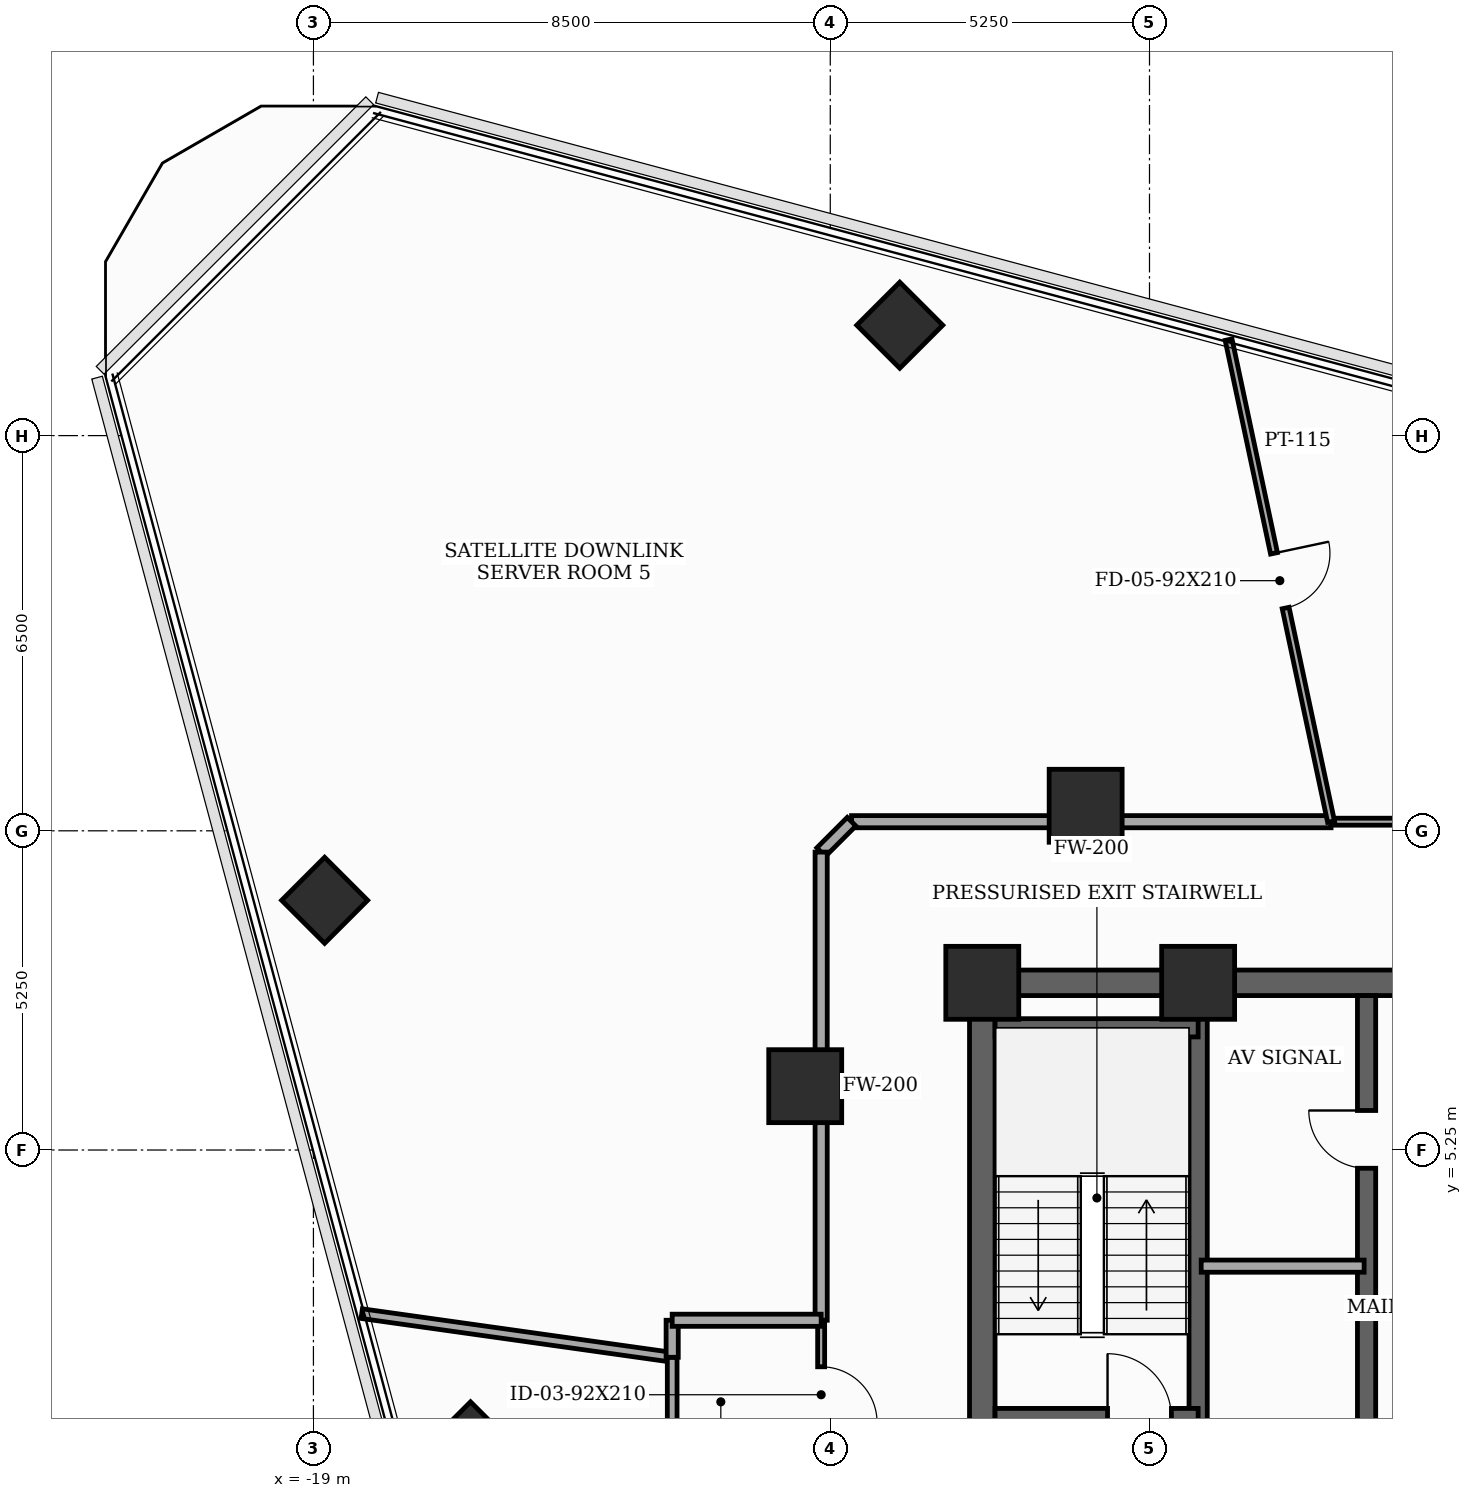
"""IFC4 building model, lengths in metres.
Left out: names, types, materials, properties, quantities, classifications, styles, units other than length and angle.
Written with IfcOpenShell. Run it as: python <this file> out.ifc"""

import sys

from ifc_helpers import new_model, si_unit, direction, frame, frame_2d, origin, origin_2d, place, context, subcontext, project, spatial, rectangle, extrude, element, fill, save


model = new_model("IFC4")
c1 = context("Model", 3, precision=1e-05, world=origin(), true_north=direction((0.0, 1.0)))
c2 = subcontext(c1, "Body", "Model", "MODEL_VIEW")
j1 = project(units=[si_unit("LENGTHUNIT", "METRE"), si_unit("PLANEANGLEUNIT", "RADIAN")], contexts=[c1])
p1 = place(None, origin())
s1 = spatial("IfcSite", under=j1, at=p1, CompositionType="ELEMENT")
p2 = place(p1, origin())
s2 = spatial("IfcBuilding", under=s1, at=p2, CompositionType="ELEMENT")
p3 = place(p2, frame((0.0, 0.0, 199.0)))
s3 = spatial("IfcBuildingStorey", under=s2, at=p3, CompositionType="ELEMENT", Elevation=199.0)
for number, where, z_axis, x_axis in (
    (1, (-4.45, 8.0, 0.0), (0.0, 0.0, 1.0), (1.0, 0.0, 0.0)),
    (2, (-8.0, 8.0, 0.0), (0.0, 0.0, 1.0), (1.0, 0.0, 0.0)),
    (3, (-6.3, 10.912, 0.0), (0.0, 0.0, 1.0), (1.0, 0.0, 0.0)),
    (4, (-10.912, 6.3, 0.0), (0.0, 0.0, 1.0), (1.0, 0.0, 0.0)),
):
    element("IfcColumn", number, at=place(p3, frame(where, z_axis=z_axis, x_axis=x_axis)), inside=s3, PredefinedType="COLUMN", context=c2, shape_type="SweptSolid", body=[
        extrude(rectangle(XDim=1.2, YDim=1.2, at=origin_2d()), origin(), (0.0, 0.0, 1.0), 3.7),
    ])
for number, where, z_axis, x_axis in (
    (5, (-9.357, 18.816, 0.0), (0.0, 0.0, 1.0), (0.707, 0.707, 0.0)),
    (6, (-18.816, 9.357, 0.0), (0.0, 0.0, 1.0), (0.707, 0.707, 0.0)),
    (7, (-16.416, 0.401, 0.0), (0.0, 0.0, 1.0), (0.707, 0.707, 0.0)),
):
    element("IfcColumn", number, at=place(p3, frame(where, z_axis=z_axis, x_axis=x_axis)), inside=s3, PredefinedType="COLUMN", context=c2, shape_type="SweptSolid", body=[
        extrude(rectangle(XDim=1.0, YDim=1.0, at=origin_2d()), origin(), (0.0, 0.0, 1.0), 3.7),
    ])
p4 = place(p3, frame((-8.0, -8.0, 0.0), z_axis=(0.0, 0.0, 1.0), x_axis=(0.0, 1.0, 0.0)))
e8 = element("IfcWall", 8, at=p4, inside=s3, PredefinedType="SHEAR", context=c2, shape_type="SweptSolid", body=[
    extrude(rectangle(XDim=16.0, YDim=0.42, at=frame_2d((8.0, 0.0))), origin(), (0.0, 0.0, 1.0), 3.5),
])
p5 = place(p4, frame((0.761, 0.0, 0.0)))
e9 = element("IfcOpeningElement", 9, at=p5, cuts=e8, PredefinedType="OPENING", context=c2, shape_type="SweptSolid", body=[
    extrude(rectangle(XDim=0.85, YDim=2.02, at=frame_2d((0.425, 1.01))), frame((0.0, 0.22, 0.0), z_axis=(0.0, -1.0, 0.0), x_axis=(1.0, 0.0, 0.0)), (0.0, 0.0, 1.0), 0.44),
])
p6 = place(p4, frame((5.35, 0.0, 0.0)))
e10 = element("IfcOpeningElement", 10, at=p6, cuts=e8, PredefinedType="OPENING", context=c2, shape_type="SweptSolid", body=[
    extrude(rectangle(XDim=1.05, YDim=2.15, at=frame_2d((0.525, 1.075))), frame((0.0, 0.22, 0.0), z_axis=(0.0, -1.0, 0.0), x_axis=(1.0, 0.0, 0.0)), (0.0, 0.0, 1.0), 0.44),
])
p7 = place(p3, frame((-8.0, 8.0, 0.0), z_axis=(0.0, 0.0, 1.0), x_axis=(1.0, 0.0, 0.0)))
e11 = element("IfcWall", 11, at=p7, inside=s3, PredefinedType="SHEAR", context=c2, shape_type="SweptSolid", body=[
    extrude(rectangle(XDim=16.0, YDim=0.42, at=frame_2d((8.0, 0.0))), origin(), (0.0, 0.0, 1.0), 3.5),
])
p8 = place(p7, frame((7.1, 0.0, 0.0)))
e12 = element("IfcOpeningElement", 12, at=p8, cuts=e11, PredefinedType="OPENING", context=c2, shape_type="SweptSolid", body=[
    extrude(rectangle(XDim=1.8, YDim=2.15, at=frame_2d((0.9, 1.075))), frame((0.0, 0.22, 0.0), z_axis=(0.0, -1.0, 0.0), x_axis=(1.0, 0.0, 0.0)), (0.0, 0.0, 1.0), 0.44),
])
p9 = place(p3, frame((-4.45, -7.79, 0.0), z_axis=(0.0, 0.0, 1.0), x_axis=(0.0, 1.0, 0.0)))
e13 = element("IfcWall", 13, at=p9, inside=s3, PredefinedType="SHEAR", context=c2, shape_type="SweptSolid", body=[
    extrude(rectangle(XDim=15.58, YDim=0.3, at=frame_2d((7.79, 0.0))), origin(), (0.0, 0.0, 1.0), 3.5),
])
p10 = place(p3, frame((-7.79, 0.85, 0.0), z_axis=(0.0, 0.0, 1.0), x_axis=(1.0, 0.0, 0.0)))
e14 = element("IfcWall", 14, at=p10, inside=s3, PredefinedType="SHEAR", context=c2, shape_type="SweptSolid", body=[
    extrude(rectangle(XDim=3.34, YDim=0.3, at=frame_2d((1.67, 0.0))), origin(), (0.0, 0.0, 1.0), 3.5),
])
p11 = place(p10, frame((1.85, 0.0, 0.0)))
e15 = element("IfcOpeningElement", 15, at=p11, cuts=e14, PredefinedType="OPENING", context=c2, shape_type="SweptSolid", body=[
    extrude(rectangle(XDim=1.05, YDim=2.15, at=frame_2d((0.525, 1.075))), frame((0.0, 0.16, 0.0), z_axis=(0.0, -1.0, 0.0), x_axis=(1.0, 0.0, 0.0)), (0.0, 0.0, 1.0), 0.32),
])
p12 = place(p3, frame((-7.79, 7.26, 0.0), z_axis=(0.0, 0.0, 1.0), x_axis=(1.0, 0.0, 0.0)))
e16 = element("IfcWall", 16, at=p12, inside=s3, PredefinedType="SHEAR", context=c2, shape_type="SweptSolid", body=[
    extrude(rectangle(XDim=3.34, YDim=0.3, at=frame_2d((1.67, 0.0))), origin(), (0.0, 0.0, 1.0), 3.5),
])
p13 = place(p3, frame((-1.68, -4.85, 0.0), z_axis=(0.0, 0.0, 1.0), x_axis=(0.0, 1.0, 0.0)))
e17 = element("IfcWall", 17, at=p13, inside=s3, PredefinedType="SHEAR", context=c2, shape_type="SweptSolid", body=[
    extrude(rectangle(XDim=12.64, YDim=0.3, at=frame_2d((6.32, 0.0))), origin(), (0.0, 0.0, 1.0), 3.5),
])
p14 = place(p13, frame((3.5, 0.0, 0.0)))
e18 = element("IfcOpeningElement", 18, at=p14, cuts=e17, PredefinedType="OPENING", context=c2, shape_type="SweptSolid", body=[
    extrude(rectangle(XDim=0.95, YDim=2.1, at=frame_2d((0.475, 1.05))), frame((0.0, 0.16, 0.0), z_axis=(0.0, -1.0, 0.0), x_axis=(1.0, 0.0, 0.0)), (0.0, 0.0, 1.0), 0.32),
])
p15 = place(p13, frame((9.8, 0.0, 0.0)))
e19 = element("IfcOpeningElement", 19, at=p15, cuts=e17, PredefinedType="OPENING", context=c2, shape_type="SweptSolid", body=[
    extrude(rectangle(XDim=0.95, YDim=2.1, at=frame_2d((0.475, 1.05))), frame((0.0, 0.16, 0.0), z_axis=(0.0, -1.0, 0.0), x_axis=(1.0, 0.0, 0.0)), (0.0, 0.0, 1.0), 0.32),
])
p16 = place(p3, frame((-4.4, 3.34, 0.0), z_axis=(0.0, 0.0, 1.0), x_axis=(1.0, 0.0, 0.0)))
e20 = element("IfcWall", 20, at=p16, inside=s3, PredefinedType="SOLIDWALL", context=c2, shape_type="SweptSolid", body=[
    extrude(rectangle(XDim=2.68, YDim=0.2, at=frame_2d((1.34, 0.0))), origin(), (0.0, 0.0, 1.0), 3.5),
])
p17 = place(p3, frame((10.15, 10.65, 0.0), z_axis=(0.0, 0.0, 1.0), x_axis=(-1.0, 0.0, 0.0)))
e21 = element("IfcWall", 21, at=p17, inside=s3, PredefinedType="PARTITIONING", context=c2, shape_type="SweptSolid", body=[
    extrude(rectangle(XDim=12.414, YDim=0.115, at=frame_2d((6.207, 0.0))), origin(), (0.0, 0.0, 1.0), 2.885),
])
p18 = place(p17, frame((7.222, 0.0, 0.0)))
e22 = element("IfcOpeningElement", 22, at=p18, cuts=e21, PredefinedType="OPENING", context=c2, shape_type="SweptSolid", body=[
    extrude(rectangle(XDim=0.95, YDim=2.1, at=frame_2d((0.475, 1.05))), frame((0.0, 0.067, 0.0), z_axis=(0.0, -1.0, 0.0), x_axis=(1.0, 0.0, 0.0)), (0.0, 0.0, 1.0), 0.135),
])
p19 = place(p3, frame((-2.264, 10.65, 0.0), z_axis=(0.0, 0.0, 1.0), x_axis=(-1.0, 0.0, 0.0)))
e23 = element("IfcWall", 23, at=p19, inside=s3, PredefinedType="SOLIDWALL", context=c2, shape_type="SweptSolid", body=[
    extrude(rectangle(XDim=7.886, YDim=0.2, at=frame_2d((3.943, 0.0))), origin(), (0.0, 0.0, 1.0), 2.885),
])
p20 = place(p3, frame((-10.15, 10.65, 0.0), z_axis=(0.0, 0.0, 1.0), x_axis=(-0.707106781187, -0.707106781187, 0.0)))
e24 = element("IfcWall", 24, at=p20, inside=s3, PredefinedType="SOLIDWALL", context=c2, shape_type="SweptSolid", body=[
    extrude(rectangle(XDim=0.707, YDim=0.2, at=frame_2d((0.354, 0.0))), origin(), (0.0, 0.0, 1.0), 3.5),
])
p21 = place(p3, frame((-10.65, 10.15, 0.0), z_axis=(0.0, 0.0, 1.0), x_axis=(0.0, -1.0, 0.0)))
e25 = element("IfcWall", 25, at=p21, inside=s3, PredefinedType="SOLIDWALL", context=c2, shape_type="SweptSolid", body=[
    extrude(rectangle(XDim=7.7, YDim=0.2, at=frame_2d((3.85, 0.0))), origin(), (0.0, 0.0, 1.0), 2.885),
])
p22 = place(p3, frame((-10.65, 2.45, 0.0), z_axis=(0.0, 0.0, 1.0), x_axis=(0.0, -1.0, 0.0)))
e26 = element("IfcWall", 26, at=p22, inside=s3, PredefinedType="PARTITIONING", context=c2, shape_type="SweptSolid", body=[
    extrude(rectangle(XDim=2.45, YDim=0.115, at=frame_2d((1.225, 0.0))), origin(), (0.0, 0.0, 1.0), 2.885),
])
p23 = place(p22, frame((0.765, 0.0, 0.0)))
e27 = element("IfcOpeningElement", 27, at=p23, cuts=e26, PredefinedType="OPENING", context=c2, shape_type="SweptSolid", body=[
    extrude(rectangle(XDim=0.92, YDim=2.1, at=frame_2d((0.46, 1.05))), frame((0.0, 0.067, 0.0), z_axis=(0.0, -1.0, 0.0), x_axis=(1.0, 0.0, 0.0)), (0.0, 0.0, 1.0), 0.135),
])
p24 = place(p3, frame((-13.1, 1.841, 0.0), z_axis=(0.0, 0.0, 1.0), x_axis=(-0.990254946284, 0.139266440179, 0.0)))
e28 = element("IfcWall", 28, at=p24, inside=s3, PredefinedType="PARTITIONING", context=c2, shape_type="SweptSolid", body=[
    extrude(rectangle(XDim=5.156, YDim=0.16, at=frame_2d((2.578, 0.0))), origin(), (0.0, 0.0, 1.0), 2.985),
])
p25 = place(p3, frame((-13.1, 0.0, 0.0), z_axis=(0.0, 0.0, 1.0), x_axis=(0.0, 1.0, 0.0)))
e29 = element("IfcWall", 29, at=p25, inside=s3, PredefinedType="PARTITIONING", context=c2, shape_type="SweptSolid", body=[
    extrude(rectangle(XDim=1.841, YDim=0.16, at=frame_2d((0.92, 0.0))), origin(), (0.0, 0.0, 1.0), 2.985),
])
p26 = place(p3, frame((-3.949, 18.578, 0.0), z_axis=(0.0, 0.0, 1.0), x_axis=(0.20795313807, -0.978138789931, 0.0)))
e30 = element("IfcWall", 30, at=p26, inside=s3, PredefinedType="PARTITIONING", context=c2, shape_type="SweptSolid", body=[
    extrude(rectangle(XDim=8.105, YDim=0.115, at=frame_2d((4.053, 0.0))), origin(), (0.0, 0.0, 1.0), 2.885),
])
p27 = place(p26, frame((3.593, 0.0, 0.0)))
e31 = element("IfcOpeningElement", 31, at=p27, cuts=e30, PredefinedType="OPENING", context=c2, shape_type="SweptSolid", body=[
    extrude(rectangle(XDim=0.92, YDim=2.1, at=frame_2d((0.46, 1.05))), frame((0.0, 0.067, 0.0), z_axis=(0.0, -1.0, 0.0), x_axis=(1.0, 0.0, 0.0)), (0.0, 0.0, 1.0), 0.135),
])
p28 = place(p3, frame((-13.1, 1.841, 0.0), z_axis=(0.0, 0.0, 1.0), x_axis=(0.0, 1.0, 0.0)))
e32 = element("IfcWall", 32, at=p28, inside=s3, PredefinedType="SOLIDWALL", context=c2, shape_type="SweptSolid", body=[
    extrude(rectangle(XDim=0.609, YDim=0.2, at=frame_2d((0.304, 0.0))), origin(), (0.0, 0.0, 1.0), 3.5),
])
p29 = place(p3, frame((-13.1, 2.45, 0.0), z_axis=(0.0, 0.0, 1.0), x_axis=(1.0, 0.0, 0.0)))
e33 = element("IfcWall", 33, at=p29, inside=s3, PredefinedType="SOLIDWALL", context=c2, shape_type="SweptSolid", body=[
    extrude(rectangle(XDim=2.45, YDim=0.2, at=frame_2d((1.225, 0.0))), origin(), (0.0, 0.0, 1.0), 2.885),
])
p30 = place(p11, origin())
e34 = element("IfcDoor", 34, at=p30, inside=s3, OperationType="SINGLE_SWING_LEFT", PredefinedType="DOOR", context=c2, shape_type="SweptSolid", body=[
    extrude(rectangle(XDim=1.05, YDim=2.15, at=frame_2d((0.525, 1.075))), frame((0.0, 0.025, 0.0), z_axis=(0.0, -1.0, 0.0), x_axis=(1.0, 0.0, 0.0)), (0.0, 0.0, 1.0), 0.05),
])
fill(e15, e34)
p31 = place(p15, origin())
e35 = element("IfcDoor", 35, at=p31, inside=s3, OperationType="SINGLE_SWING_RIGHT", PredefinedType="DOOR", context=c2, shape_type="SweptSolid", body=[
    extrude(rectangle(XDim=0.95, YDim=2.1, at=frame_2d((0.475, 1.05))), frame((0.0, 0.025, 0.0), z_axis=(0.0, -1.0, 0.0), x_axis=(1.0, 0.0, 0.0)), (0.0, 0.0, 1.0), 0.05),
])
fill(e19, e35)
p32 = place(p23, origin())
e36 = element("IfcDoor", 36, at=p32, inside=s3, OperationType="SINGLE_SWING_RIGHT", PredefinedType="DOOR", context=c2, shape_type="SweptSolid", body=[
    extrude(rectangle(XDim=0.92, YDim=2.1, at=frame_2d((0.46, 1.05))), frame((0.0, 0.025, 0.0), z_axis=(0.0, -1.0, 0.0), x_axis=(1.0, 0.0, 0.0)), (0.0, 0.0, 1.0), 0.05),
])
fill(e27, e36)
p33 = place(p27, origin())
e37 = element("IfcDoor", 37, at=p33, inside=s3, OperationType="SINGLE_SWING_LEFT", PredefinedType="DOOR", context=c2, shape_type="SweptSolid", body=[
    extrude(rectangle(XDim=0.92, YDim=2.1, at=frame_2d((0.46, 1.05))), frame((0.0, 0.025, 0.0), z_axis=(0.0, -1.0, 0.0), x_axis=(1.0, 0.0, 0.0)), (0.0, 0.0, 1.0), 0.05),
])
fill(e31, e37)
save(model, sys.argv[1])
